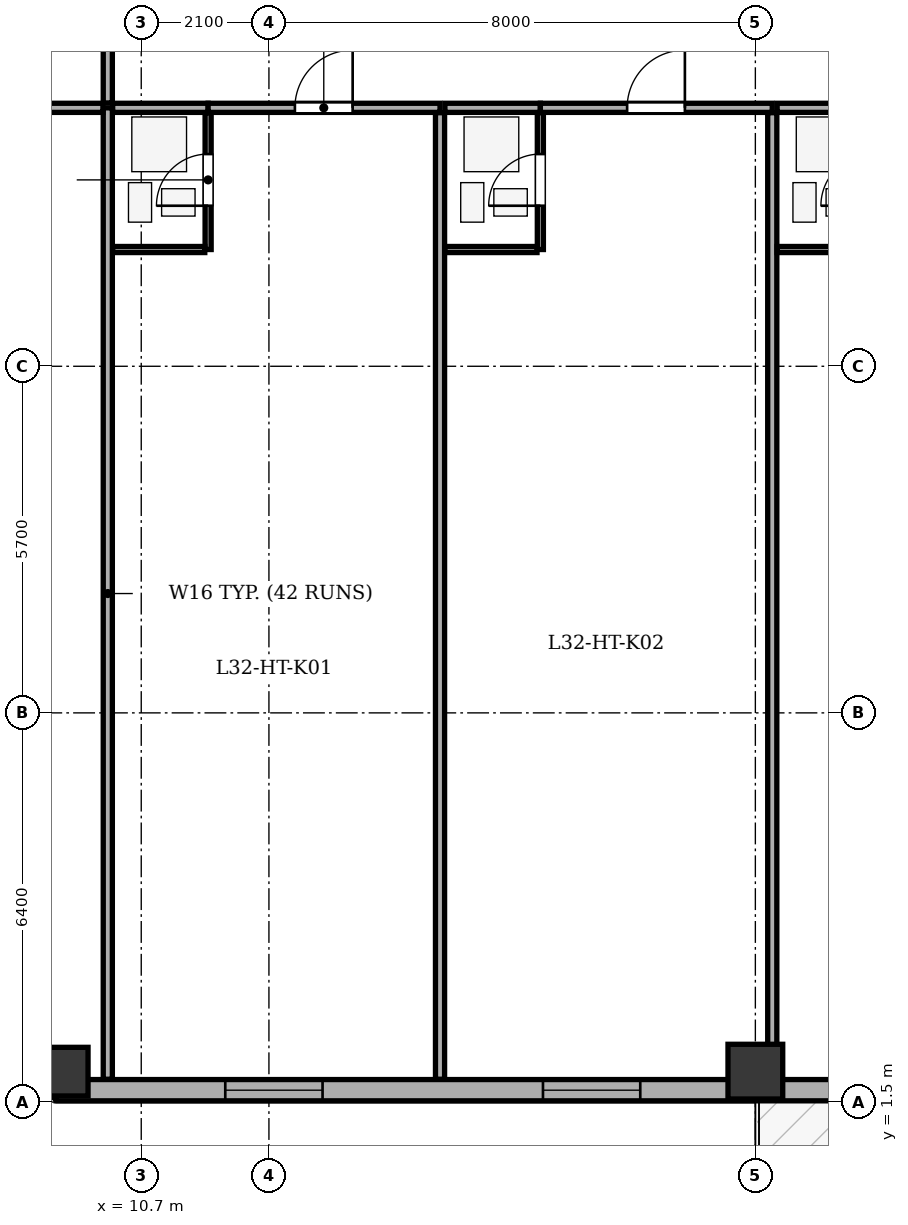
"""IFC4 building model, lengths in metres.
Left out: names, types, materials, properties, quantities, classifications, styles, units other than length and angle.
Written with IfcOpenShell. Run it as: python <this file> out.ifc"""

import sys

from ifc_helpers import new_model, si_unit, direction, frame, frame_2d, origin, origin_2d, place, context, subcontext, project, spatial, rectangle, extrude, element, fill, save


model = new_model("IFC4")
c1 = context("Model", 3, precision=1e-05, world=origin(), true_north=direction((0.0, 1.0)))
c2 = subcontext(c1, "Body", "Model", "MODEL_VIEW")
j1 = project(units=[si_unit("LENGTHUNIT", "METRE"), si_unit("PLANEANGLEUNIT", "RADIAN")], contexts=[c1])
p1 = place(None, origin())
s1 = spatial("IfcSite", under=j1, at=p1, CompositionType="ELEMENT")
p2 = place(p1, origin())
s2 = spatial("IfcBuilding", under=s1, at=p2, CompositionType="ELEMENT")
p3 = place(p2, frame((0.0, 0.0, 130.8)))
s3 = spatial("IfcBuildingStorey", under=s2, at=p3, CompositionType="ELEMENT", Elevation=130.8)
p4 = place(p3, frame((9.3, 2.0, 0.0), z_axis=(0.0, 0.0, 1.0), x_axis=(1.0, 0.0, 0.0)))
e1 = element("IfcColumn", 1, at=p4, inside=s3, PredefinedType="COLUMN", context=c2, shape_type="SweptSolid", body=[
    extrude(rectangle(XDim=0.8, YDim=1.05, at=origin_2d()), origin(), (0.0, 0.0, 1.0), 3.5),
])
p5 = place(p3, frame((20.8, 2.0, 0.0), z_axis=(0.0, 0.0, 1.0), x_axis=(1.0, 0.0, 0.0)))
e2 = element("IfcColumn", 2, at=p5, inside=s3, PredefinedType="COLUMN", context=c2, shape_type="SweptSolid", body=[
    extrude(rectangle(XDim=0.9, YDim=0.9, at=origin_2d()), origin(), (0.0, 0.0, 1.0), 3.5),
])
p6 = place(p3, frame((44.3, 1.695, 0.0), z_axis=(0.0, 0.0, 1.0), x_axis=(-1.0, 0.0, 0.0)))
e3 = element("IfcWall", 3, at=p6, inside=s3, PredefinedType="STANDARD", context=c2, shape_type="SweptSolid", body=[
    extrude(rectangle(XDim=35.0, YDim=0.35, at=frame_2d((17.5, 0.0))), origin(), (0.0, 0.0, 1.0), 2.785),
])
p7 = place(p6, frame((19.6, 0.0, 0.0)))
e4 = element("IfcOpeningElement", 4, at=p7, cuts=e3, PredefinedType="OPENING", context=c2, shape_type="SweptSolid", body=[
    extrude(rectangle(XDim=1.0, YDim=2.02, at=frame_2d((0.5, 1.01))), frame((0.0, 0.185, 0.0), z_axis=(0.0, -1.0, 0.0), x_axis=(1.0, 0.0, 0.0)), (0.0, 0.0, 1.0), 0.37),
])
p8 = place(p6, frame((2.24, 0.0, 0.75)))
e5 = element("IfcOpeningElement", 5, at=p8, cuts=e3, PredefinedType="OPENING", context=c2, shape_type="SweptSolid", body=[
    extrude(rectangle(XDim=1.6, YDim=1.75, at=frame_2d((0.8, 0.875))), frame((0.0, 0.185, 0.0), z_axis=(0.0, -1.0, 0.0), x_axis=(1.0, 0.0, 0.0)), (0.0, 0.0, 1.0), 0.37),
])
p9 = place(p6, frame((6.678, 0.0, 0.75)))
e6 = element("IfcOpeningElement", 6, at=p9, cuts=e3, PredefinedType="OPENING", context=c2, shape_type="SweptSolid", body=[
    extrude(rectangle(XDim=1.35, YDim=1.75, at=frame_2d((0.675, 0.875))), frame((0.0, 0.185, 0.0), z_axis=(0.0, -1.0, 0.0), x_axis=(1.0, 0.0, 0.0)), (0.0, 0.0, 1.0), 0.37),
])
p10 = place(p6, frame((13.055, 0.0, 0.75)))
e7 = element("IfcOpeningElement", 7, at=p10, cuts=e3, PredefinedType="OPENING", context=c2, shape_type="SweptSolid", body=[
    extrude(rectangle(XDim=1.6, YDim=1.75, at=frame_2d((0.8, 0.875))), frame((0.0, 0.185, 0.0), z_axis=(0.0, -1.0, 0.0), x_axis=(1.0, 0.0, 0.0)), (0.0, 0.0, 1.0), 0.37),
])
p11 = place(p6, frame((25.393, 0.0, 0.75)))
e8 = element("IfcOpeningElement", 8, at=p11, cuts=e3, PredefinedType="OPENING", context=c2, shape_type="SweptSolid", body=[
    extrude(rectangle(XDim=1.6, YDim=1.75, at=frame_2d((0.8, 0.875))), frame((0.0, 0.185, 0.0), z_axis=(0.0, -1.0, 0.0), x_axis=(1.0, 0.0, 0.0)), (0.0, 0.0, 1.0), 0.37),
])
p12 = place(p6, frame((30.618, 0.0, 0.75)))
e9 = element("IfcOpeningElement", 9, at=p12, cuts=e3, PredefinedType="OPENING", context=c2, shape_type="SweptSolid", body=[
    extrude(rectangle(XDim=1.6, YDim=1.75, at=frame_2d((0.8, 0.875))), frame((0.0, 0.185, 0.0), z_axis=(0.0, -1.0, 0.0), x_axis=(1.0, 0.0, 0.0)), (0.0, 0.0, 1.0), 0.37),
])
p13 = place(p3, frame((9.3, 1.695, 0.0), z_axis=(0.0, 0.0, 1.0), x_axis=(-0.707106781187, 0.707106781187, 0.0)))
e10 = element("IfcWall", 10, at=p13, inside=s3, PredefinedType="STANDARD", context=c2, shape_type="SweptSolid", body=[
    extrude(rectangle(XDim=6.795, YDim=0.35, at=frame_2d((3.397, 0.0))), origin(), (0.0, 0.0, 1.0), 2.785),
])
p14 = place(p13, frame((2.698, 0.0, 0.75)))
e11 = element("IfcOpeningElement", 11, at=p14, cuts=e10, PredefinedType="OPENING", context=c2, shape_type="SweptSolid", body=[
    extrude(rectangle(XDim=1.4, YDim=1.65, at=frame_2d((0.7, 0.825))), frame((0.0, 0.185, 0.0), z_axis=(0.0, -1.0, 0.0), x_axis=(1.0, 0.0, 0.0)), (0.0, 0.0, 1.0), 0.37),
])
p15 = place(p3, frame((10.15, 1.875, 0.0), z_axis=(0.0, 0.0, 1.0), x_axis=(0.0, 1.0, 0.0)))
e12 = element("IfcWall", 12, at=p15, inside=s3, PredefinedType="PARTITIONING", context=c2, shape_type="SweptSolid", body=[
    extrude(rectangle(XDim=15.975, YDim=0.15, at=frame_2d((7.988, 0.0))), origin(), (0.0, 0.0, 1.0), 3.2),
])
p16 = place(p3, frame((10.23, 17.85, 0.0), z_axis=(0.0, 0.0, 1.0), x_axis=(1.0, 0.0, 0.0)))
e13 = element("IfcWall", 13, at=p16, inside=s3, PredefinedType="PARTITIONING", context=c2, shape_type="SweptSolid", body=[
    extrude(rectangle(XDim=1.57, YDim=0.15, at=frame_2d((0.785, 0.0))), origin(), (0.0, 0.0, 1.0), 3.2),
])
p17 = place(p3, frame((11.8, 17.85, 0.0), z_axis=(0.0, 0.0, 1.0), x_axis=(1.0, 0.0, 0.0)))
e14 = element("IfcWall", 14, at=p17, inside=s3, PredefinedType="PARTITIONING", context=c2, shape_type="SweptSolid", body=[
    extrude(rectangle(XDim=3.814, YDim=0.15, at=frame_2d((1.907, 0.0))), origin(), (0.0, 0.0, 1.0), 3.2),
])
p18 = place(p17, frame((1.427, 0.0, 0.0)))
e15 = element("IfcOpeningElement", 15, at=p18, cuts=e14, PredefinedType="OPENING", context=c2, shape_type="SweptSolid", body=[
    extrude(rectangle(XDim=0.95, YDim=2.1, at=frame_2d((0.475, 1.05))), frame((0.0, 0.085, 0.0), z_axis=(0.0, -1.0, 0.0), x_axis=(1.0, 0.0, 0.0)), (0.0, 0.0, 1.0), 0.17),
])
p19 = place(p3, frame((11.8, 15.52, 0.0), z_axis=(0.0, 0.0, 1.0), x_axis=(0.0, 1.0, 0.0)))
e16 = element("IfcWall", 16, at=p19, inside=s3, PredefinedType="PARTITIONING", context=c2, shape_type="SweptSolid", body=[
    extrude(rectangle(XDim=2.25, YDim=0.1, at=frame_2d((1.125, 0.0))), origin(), (0.0, 0.0, 1.0), 3.2),
])
p20 = place(p19, frame((0.72, 0.0, 0.0)))
e17 = element("IfcOpeningElement", 17, at=p20, cuts=e16, PredefinedType="OPENING", context=c2, shape_type="SweptSolid", body=[
    extrude(rectangle(XDim=0.85, YDim=2.05, at=frame_2d((0.425, 1.025))), frame((0.0, 0.06, 0.0), z_axis=(0.0, -1.0, 0.0), x_axis=(1.0, 0.0, 0.0)), (0.0, 0.0, 1.0), 0.12),
])
p21 = place(p3, frame((10.23, 15.52, 0.0), z_axis=(0.0, 0.0, 1.0), x_axis=(1.0, 0.0, 0.0)))
e18 = element("IfcWall", 18, at=p21, inside=s3, PredefinedType="PARTITIONING", context=c2, shape_type="SweptSolid", body=[
    extrude(rectangle(XDim=1.515, YDim=0.1, at=frame_2d((0.758, 0.0))), origin(), (0.0, 0.0, 1.0), 3.2),
])
p22 = place(p3, frame((15.614, 1.875, 0.0), z_axis=(0.0, 0.0, 1.0), x_axis=(0.0, 1.0, 0.0)))
e19 = element("IfcWall", 19, at=p22, inside=s3, PredefinedType="PARTITIONING", context=c2, shape_type="SweptSolid", body=[
    extrude(rectangle(XDim=15.895, YDim=0.15, at=frame_2d((7.948, 0.0))), origin(), (0.0, 0.0, 1.0), 3.2),
])
p23 = place(p3, frame((15.694, 17.85, 0.0), z_axis=(0.0, 0.0, 1.0), x_axis=(1.0, 0.0, 0.0)))
e20 = element("IfcWall", 20, at=p23, inside=s3, PredefinedType="PARTITIONING", context=c2, shape_type="SweptSolid", body=[
    extrude(rectangle(XDim=1.57, YDim=0.15, at=frame_2d((0.785, 0.0))), origin(), (0.0, 0.0, 1.0), 3.2),
])
p24 = place(p3, frame((17.264, 17.85, 0.0), z_axis=(0.0, 0.0, 1.0), x_axis=(1.0, 0.0, 0.0)))
e21 = element("IfcWall", 21, at=p24, inside=s3, PredefinedType="PARTITIONING", context=c2, shape_type="SweptSolid", body=[
    extrude(rectangle(XDim=3.814, YDim=0.15, at=frame_2d((1.907, 0.0))), origin(), (0.0, 0.0, 1.0), 3.2),
])
p25 = place(p24, frame((1.427, 0.0, 0.0)))
e22 = element("IfcOpeningElement", 22, at=p25, cuts=e21, PredefinedType="OPENING", context=c2, shape_type="SweptSolid", body=[
    extrude(rectangle(XDim=0.95, YDim=2.1, at=frame_2d((0.475, 1.05))), frame((0.0, 0.085, 0.0), z_axis=(0.0, -1.0, 0.0), x_axis=(1.0, 0.0, 0.0)), (0.0, 0.0, 1.0), 0.17),
])
p26 = place(p3, frame((17.264, 15.52, 0.0), z_axis=(0.0, 0.0, 1.0), x_axis=(0.0, 1.0, 0.0)))
e23 = element("IfcWall", 23, at=p26, inside=s3, PredefinedType="PARTITIONING", context=c2, shape_type="SweptSolid", body=[
    extrude(rectangle(XDim=2.25, YDim=0.1, at=frame_2d((1.125, 0.0))), origin(), (0.0, 0.0, 1.0), 3.2),
])
p27 = place(p26, frame((0.72, 0.0, 0.0)))
e24 = element("IfcOpeningElement", 24, at=p27, cuts=e23, PredefinedType="OPENING", context=c2, shape_type="SweptSolid", body=[
    extrude(rectangle(XDim=0.85, YDim=2.05, at=frame_2d((0.425, 1.025))), frame((0.0, 0.06, 0.0), z_axis=(0.0, -1.0, 0.0), x_axis=(1.0, 0.0, 0.0)), (0.0, 0.0, 1.0), 0.12),
])
p28 = place(p3, frame((15.694, 15.52, 0.0), z_axis=(0.0, 0.0, 1.0), x_axis=(1.0, 0.0, 0.0)))
e25 = element("IfcWall", 25, at=p28, inside=s3, PredefinedType="PARTITIONING", context=c2, shape_type="SweptSolid", body=[
    extrude(rectangle(XDim=1.515, YDim=0.1, at=frame_2d((0.757, 0.0))), origin(), (0.0, 0.0, 1.0), 3.2),
])
p29 = place(p3, frame((21.078, 1.875, 0.0), z_axis=(0.0, 0.0, 1.0), x_axis=(0.0, 1.0, 0.0)))
e26 = element("IfcWall", 26, at=p29, inside=s3, PredefinedType="PARTITIONING", context=c2, shape_type="SweptSolid", body=[
    extrude(rectangle(XDim=15.895, YDim=0.15, at=frame_2d((7.948, 0.0))), origin(), (0.0, 0.0, 1.0), 2.535),
])
p30 = place(p3, frame((21.158, 17.85, 0.0), z_axis=(0.0, 0.0, 1.0), x_axis=(1.0, 0.0, 0.0)))
e27 = element("IfcWall", 27, at=p30, inside=s3, PredefinedType="PARTITIONING", context=c2, shape_type="SweptSolid", body=[
    extrude(rectangle(XDim=1.57, YDim=0.15, at=frame_2d((0.785, 0.0))), origin(), (0.0, 0.0, 1.0), 3.2),
])
p31 = place(p3, frame((21.158, 15.52, 0.0), z_axis=(0.0, 0.0, 1.0), x_axis=(1.0, 0.0, 0.0)))
e28 = element("IfcWall", 28, at=p31, inside=s3, PredefinedType="PARTITIONING", context=c2, shape_type="SweptSolid", body=[
    extrude(rectangle(XDim=1.515, YDim=0.1, at=frame_2d((0.758, 0.0))), origin(), (0.0, 0.0, 1.0), 3.2),
])
p32 = place(p3, frame((4.675, 17.85, 0.0), z_axis=(0.0, 0.0, 1.0), x_axis=(1.0, 0.0, 0.0)))
e29 = element("IfcWall", 29, at=p32, inside=s3, PredefinedType="PARTITIONING", context=c2, shape_type="SweptSolid", body=[
    extrude(rectangle(XDim=5.395, YDim=0.15, at=frame_2d((2.698, 0.0))), origin(), (0.0, 0.0, 1.0), 3.2),
])
p33 = place(p3, frame((10.15, 17.93, 0.0), z_axis=(0.0, 0.0, 1.0), x_axis=(0.0, 1.0, 0.0)))
e30 = element("IfcWall", 30, at=p33, inside=s3, PredefinedType="PARTITIONING", context=c2, shape_type="SweptSolid", body=[
    extrude(rectangle(XDim=9.27, YDim=0.15, at=frame_2d((4.635, 0.0))), origin(), (0.0, 0.0, 1.0), 3.2),
])
p34 = place(p33, frame((4.115, 0.0, 0.0)))
e31 = element("IfcOpeningElement", 31, at=p34, cuts=e30, PredefinedType="OPENING", context=c2, shape_type="SweptSolid", body=[
    extrude(rectangle(XDim=0.95, YDim=2.1, at=frame_2d((0.475, 1.05))), frame((0.0, 0.085, 0.0), z_axis=(0.0, -1.0, 0.0), x_axis=(1.0, 0.0, 0.0)), (0.0, 0.0, 1.0), 0.17),
])
p35 = place(p11, origin())
e32 = element("IfcWindow", 32, at=p35, inside=s3, PartitioningType="SINGLE_PANEL", PredefinedType="WINDOW", context=c2, shape_type="SweptSolid", body=[
    extrude(rectangle(XDim=1.6, YDim=1.75, at=frame_2d((0.8, 0.875))), frame((0.0, -0.01, 0.0), z_axis=(0.0, -1.0, 0.0), x_axis=(1.0, 0.0, 0.0)), (0.0, 0.0, 1.0), 0.06),
])
fill(e8, e32)
p36 = place(p12, origin())
e33 = element("IfcWindow", 33, at=p36, inside=s3, PartitioningType="SINGLE_PANEL", PredefinedType="WINDOW", context=c2, shape_type="SweptSolid", body=[
    extrude(rectangle(XDim=1.6, YDim=1.75, at=frame_2d((0.8, 0.875))), frame((0.0, -0.01, 0.0), z_axis=(0.0, -1.0, 0.0), x_axis=(1.0, 0.0, 0.0)), (0.0, 0.0, 1.0), 0.06),
])
fill(e9, e33)
p37 = place(p20, origin())
e34 = element("IfcDoor", 34, at=p37, inside=s3, OperationType="SINGLE_SWING_LEFT", PredefinedType="DOOR", context=c2, shape_type="SweptSolid", body=[
    extrude(rectangle(XDim=0.85, YDim=2.05, at=frame_2d((0.425, 1.025))), frame((0.0, 0.025, 0.0), z_axis=(0.0, -1.0, 0.0), x_axis=(1.0, 0.0, 0.0)), (0.0, 0.0, 1.0), 0.05),
])
fill(e17, e34)
p38 = place(p18, origin())
e35 = element("IfcDoor", 35, at=p38, inside=s3, OperationType="SINGLE_SWING_RIGHT", PredefinedType="DOOR", context=c2, shape_type="SweptSolid", body=[
    extrude(rectangle(XDim=0.95, YDim=2.1, at=frame_2d((0.475, 1.05))), frame((0.0, 0.025, 0.0), z_axis=(0.0, -1.0, 0.0), x_axis=(1.0, 0.0, 0.0)), (0.0, 0.0, 1.0), 0.05),
])
fill(e15, e35)
p39 = place(p27, origin())
e36 = element("IfcDoor", 36, at=p39, inside=s3, OperationType="SINGLE_SWING_LEFT", PredefinedType="DOOR", context=c2, shape_type="SweptSolid", body=[
    extrude(rectangle(XDim=0.85, YDim=2.05, at=frame_2d((0.425, 1.025))), frame((0.0, 0.025, 0.0), z_axis=(0.0, -1.0, 0.0), x_axis=(1.0, 0.0, 0.0)), (0.0, 0.0, 1.0), 0.05),
])
fill(e24, e36)
p40 = place(p25, origin())
e37 = element("IfcDoor", 37, at=p40, inside=s3, OperationType="SINGLE_SWING_RIGHT", PredefinedType="DOOR", context=c2, shape_type="SweptSolid", body=[
    extrude(rectangle(XDim=0.95, YDim=2.1, at=frame_2d((0.475, 1.05))), frame((0.0, 0.025, 0.0), z_axis=(0.0, -1.0, 0.0), x_axis=(1.0, 0.0, 0.0)), (0.0, 0.0, 1.0), 0.05),
])
fill(e22, e37)
save(model, sys.argv[1])
